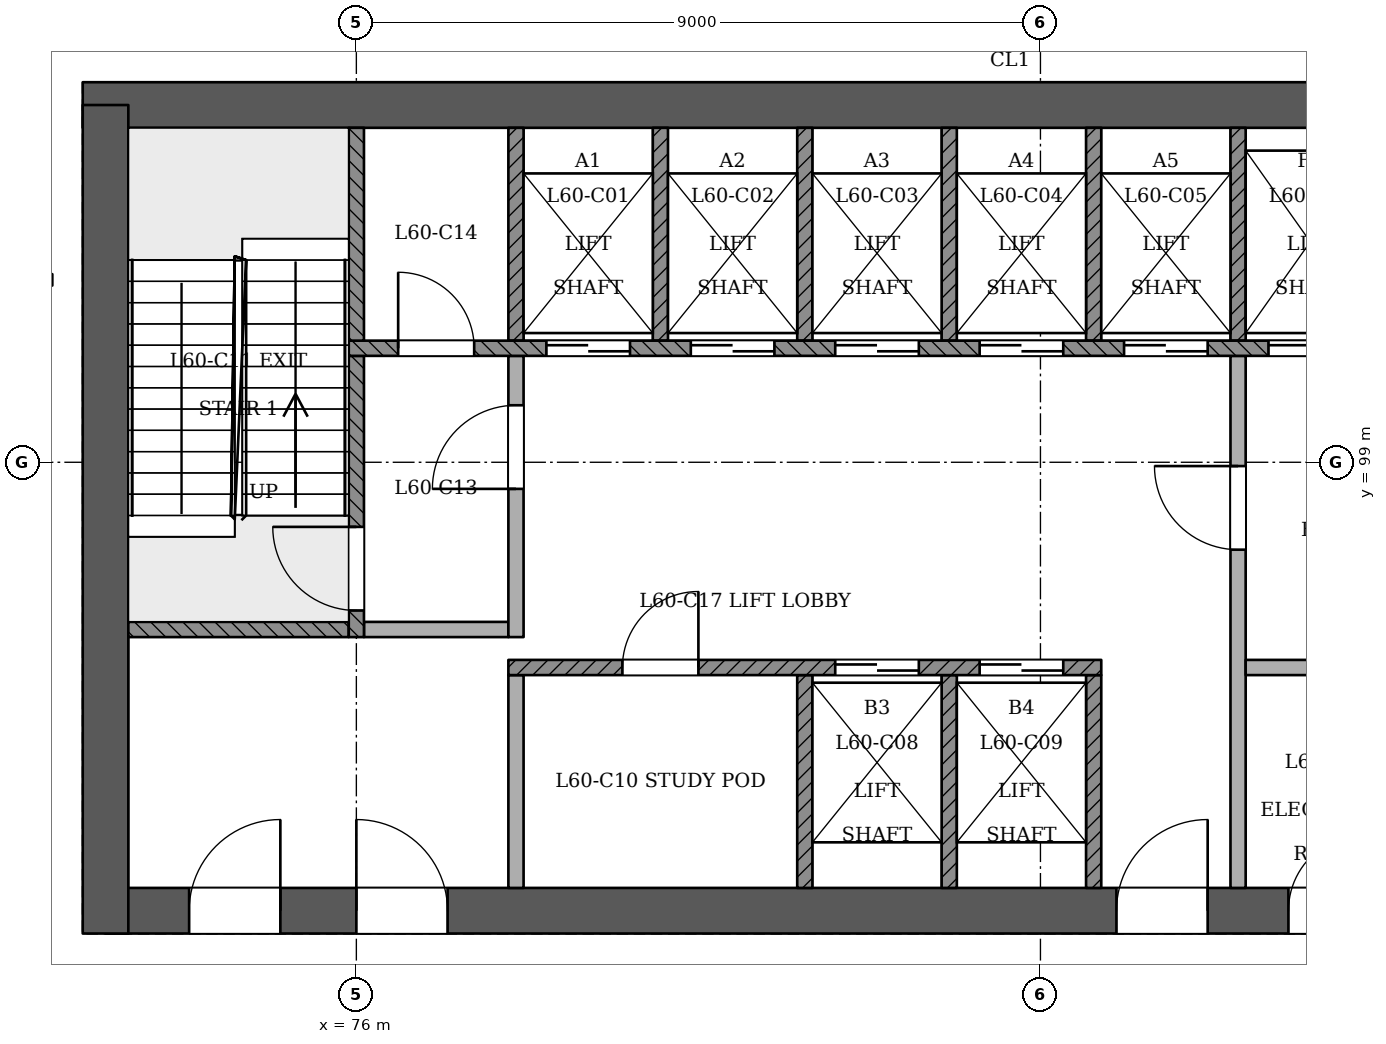
"""IFC4 building model, lengths in metres.
Left out: names, types, materials, properties, quantities, classifications, styles, units other than length and angle.
Written with IfcOpenShell. Run it as: python <this file> out.ifc"""

import sys

from ifc_helpers import new_model, si_unit, direction, frame, frame_2d, origin, place, context, subcontext, project, spatial, rectangle, extrude, element, fill, save


model = new_model("IFC4")
c1 = context("Model", 3, precision=1e-05, world=origin(), true_north=direction((0.0, 1.0)))
c2 = subcontext(c1, "Body", "Model", "MODEL_VIEW")
j1 = project(units=[si_unit("LENGTHUNIT", "METRE"), si_unit("PLANEANGLEUNIT", "RADIAN")], contexts=[c1])
p1 = place(None, origin())
s1 = spatial("IfcSite", under=j1, at=p1, CompositionType="ELEMENT")
p2 = place(p1, origin())
s2 = spatial("IfcBuilding", under=s1, at=p2, CompositionType="ELEMENT")
p3 = place(p2, frame((0.0, 0.0, 233.8)))
s3 = spatial("IfcBuildingStorey", under=s2, at=p3, CompositionType="ELEMENT", Elevation=233.8)
p4 = place(p3, frame((72.7, 93.1, 0.0), z_axis=(0.0, 0.0, 1.0), x_axis=(1.0, 0.0, 0.0)))
e1 = element("IfcWall", 1, at=p4, inside=s3, PredefinedType="SHEAR", context=c2, shape_type="SweptSolid", body=[
    extrude(rectangle(XDim=24.9, YDim=0.6, at=frame_2d((12.45, 0.0))), origin(), (0.0, 0.0, 1.0), 5.4),
])
p5 = place(p4, frame((1.1, 0.0, 0.0)))
e2 = element("IfcOpeningElement", 2, at=p5, cuts=e1, PredefinedType="OPENING", context=c2, shape_type="SweptSolid", body=[
    extrude(rectangle(XDim=1.2, YDim=2.1, at=frame_2d((0.6, 1.05))), frame((0.0, 0.311, 0.0), z_axis=(0.0, -1.0, 0.0), x_axis=(1.0, 0.0, 0.0)), (0.0, 0.0, 1.0), 0.621),
])
p6 = place(p4, frame((3.3, 0.0, 0.0)))
e3 = element("IfcOpeningElement", 3, at=p6, cuts=e1, PredefinedType="OPENING", context=c2, shape_type="SweptSolid", body=[
    extrude(rectangle(XDim=1.2, YDim=2.1, at=frame_2d((0.6, 1.05))), frame((0.0, 0.311, 0.0), z_axis=(0.0, -1.0, 0.0), x_axis=(1.0, 0.0, 0.0)), (0.0, 0.0, 1.0), 0.621),
])
p7 = place(p4, frame((13.3, 0.0, 0.0)))
e4 = element("IfcOpeningElement", 4, at=p7, cuts=e1, PredefinedType="OPENING", context=c2, shape_type="SweptSolid", body=[
    extrude(rectangle(XDim=1.2, YDim=2.1, at=frame_2d((0.6, 1.05))), frame((0.0, 0.311, 0.0), z_axis=(0.0, -1.0, 0.0), x_axis=(1.0, 0.0, 0.0)), (0.0, 0.0, 1.0), 0.621),
])
p8 = place(p4, frame((15.562, 0.0, 0.0)))
e5 = element("IfcOpeningElement", 5, at=p8, cuts=e1, PredefinedType="OPENING", context=c2, shape_type="SweptSolid", body=[
    extrude(rectangle(XDim=1.0, YDim=2.1, at=frame_2d((0.5, 1.05))), frame((0.0, 0.311, 0.0), z_axis=(0.0, -1.0, 0.0), x_axis=(1.0, 0.0, 0.0)), (0.0, 0.0, 1.0), 0.621),
])
p9 = place(p4, frame((18.2, 0.0, 0.0)))
e6 = element("IfcOpeningElement", 6, at=p9, cuts=e1, PredefinedType="OPENING", context=c2, shape_type="SweptSolid", body=[
    extrude(rectangle(XDim=1.0, YDim=2.1, at=frame_2d((0.5, 1.05))), frame((0.0, 0.311, 0.0), z_axis=(0.0, -1.0, 0.0), x_axis=(1.0, 0.0, 0.0)), (0.0, 0.0, 1.0), 0.621),
])
p10 = place(p4, frame((21.788, 0.0, 0.0)))
e7 = element("IfcOpeningElement", 7, at=p10, cuts=e1, PredefinedType="OPENING", context=c2, shape_type="SweptSolid", body=[
    extrude(rectangle(XDim=1.0, YDim=2.1, at=frame_2d((0.5, 1.05))), frame((0.0, 0.311, 0.0), z_axis=(0.0, -1.0, 0.0), x_axis=(1.0, 0.0, 0.0)), (0.0, 0.0, 1.0), 0.621),
])
p11 = place(p3, frame((97.3, 103.7, 0.0), z_axis=(0.0, 0.0, 1.0), x_axis=(-1.0, 0.0, 0.0)))
e8 = element("IfcWall", 8, at=p11, inside=s3, PredefinedType="SHEAR", context=c2, shape_type="SweptSolid", body=[
    extrude(rectangle(XDim=24.9, YDim=0.6, at=frame_2d((12.45, 0.0))), origin(), (0.0, 0.0, 1.0), 5.4),
])
p12 = place(p3, frame((72.7, 103.7, 0.0), z_axis=(0.0, 0.0, 1.0), x_axis=(0.0, -1.0, 0.0)))
e9 = element("IfcWall", 9, at=p12, inside=s3, PredefinedType="SHEAR", context=c2, shape_type="SweptSolid", body=[
    extrude(rectangle(XDim=10.9, YDim=0.6, at=frame_2d((5.45, 0.0))), origin(), (0.0, 0.0, 1.0), 5.4),
])
p13 = place(p3, frame((72.0, 101.4, 0.0), z_axis=(0.0, 0.0, 1.0), x_axis=(-1.0, 0.0, 0.0)))
e10 = element("IfcWall", 10, at=p13, inside=s3, PredefinedType="PARTITIONING", context=c2, shape_type="SweptSolid", body=[
    extrude(rectangle(XDim=1.8, YDim=0.15, at=frame_2d((0.9, 0.0))), origin(), (0.0, 0.0, 1.0), 5.0),
])
p14 = place(p3, frame((78.1, 93.4, 0.0), z_axis=(0.0, 0.0, 1.0), x_axis=(0.0, 1.0, 0.0)))
e11 = element("IfcWall", 11, at=p14, inside=s3, PredefinedType="PARTITIONING", context=c2, shape_type="SweptSolid", body=[
    extrude(rectangle(XDim=2.8, YDim=0.2, at=frame_2d((1.4, 0.0))), origin(), (0.0, 0.0, 1.0), 5.0),
])
for number, where, z_axis, x_axis in (
    (12, (81.9, 93.4, 0.0), (0.0, 0.0, 1.0), (0.0, 1.0, 0.0)),
    (13, (83.8, 93.4, 0.0), (0.0, 0.0, 1.0), (0.0, 1.0, 0.0)),
    (14, (85.7, 93.4, 0.0), (0.0, 0.0, 1.0), (0.0, 1.0, 0.0)),
):
    element("IfcWall", number, at=place(p3, frame(where, z_axis=z_axis, x_axis=x_axis)), inside=s3, PredefinedType="SOLIDWALL", context=c2, shape_type="SweptSolid", body=[
        extrude(rectangle(XDim=2.8, YDim=0.2, at=frame_2d((1.4, 0.0))), origin(), (0.0, 0.0, 1.0), 5.0),
    ])
p15 = place(p3, frame((87.6, 93.4, 0.0), z_axis=(0.0, 0.0, 1.0), x_axis=(0.0, 1.0, 0.0)))
e15 = element("IfcWall", 15, at=p15, inside=s3, PredefinedType="PARTITIONING", context=c2, shape_type="SweptSolid", body=[
    extrude(rectangle(XDim=7.0, YDim=0.2, at=frame_2d((3.5, 0.0))), origin(), (0.0, 0.0, 1.0), 5.0),
])
p16 = place(p15, frame((4.45, 0.0, 0.0)))
e16 = element("IfcOpeningElement", 16, at=p16, cuts=e15, PredefinedType="OPENING", context=c2, shape_type="SweptSolid", body=[
    extrude(rectangle(XDim=1.1, YDim=2.1, at=frame_2d((0.55, 1.05))), frame((0.0, 0.11, 0.0), z_axis=(0.0, -1.0, 0.0), x_axis=(1.0, 0.0, 0.0)), (0.0, 0.0, 1.0), 0.221),
])
p17 = place(p3, frame((78.0, 96.3, 0.0), z_axis=(0.0, 0.0, 1.0), x_axis=(1.0, 0.0, 0.0)))
e17 = element("IfcWall", 17, at=p17, inside=s3, PredefinedType="SOLIDWALL", context=c2, shape_type="SweptSolid", body=[
    extrude(rectangle(XDim=7.8, YDim=0.2, at=frame_2d((3.9, 0.0))), origin(), (0.0, 0.0, 1.0), 5.0),
])
p18 = place(p17, frame((4.3, 0.0, 0.0)))
e18 = element("IfcOpeningElement", 18, at=p18, cuts=e17, PredefinedType="OPENING", context=c2, shape_type="SweptSolid", body=[
    extrude(rectangle(XDim=1.1, YDim=2.1, at=frame_2d((0.55, 1.05))), frame((0.0, 0.11, 0.0), z_axis=(0.0, -1.0, 0.0), x_axis=(1.0, 0.0, 0.0)), (0.0, 0.0, 1.0), 0.221),
])
p19 = place(p17, frame((6.2, 0.0, 0.0)))
e19 = element("IfcOpeningElement", 19, at=p19, cuts=e17, PredefinedType="OPENING", context=c2, shape_type="SweptSolid", body=[
    extrude(rectangle(XDim=1.1, YDim=2.1, at=frame_2d((0.55, 1.05))), frame((0.0, 0.11, 0.0), z_axis=(0.0, -1.0, 0.0), x_axis=(1.0, 0.0, 0.0)), (0.0, 0.0, 1.0), 0.221),
])
p20 = place(p17, frame((1.5, 0.0, 0.0)))
e20 = element("IfcOpeningElement", 20, at=p20, cuts=e17, PredefinedType="OPENING", context=c2, shape_type="SweptSolid", body=[
    extrude(rectangle(XDim=1.0, YDim=2.1, at=frame_2d((0.5, 1.05))), frame((0.0, 0.11, 0.0), z_axis=(0.0, -1.0, 0.0), x_axis=(1.0, 0.0, 0.0)), (0.0, 0.0, 1.0), 0.221),
])
p21 = place(p3, frame((87.7, 96.3, 0.0), z_axis=(0.0, 0.0, 1.0), x_axis=(1.0, 0.0, 0.0)))
e21 = element("IfcWall", 21, at=p21, inside=s3, PredefinedType="PARTITIONING", context=c2, shape_type="SweptSolid", body=[
    extrude(rectangle(XDim=3.6, YDim=0.2, at=frame_2d((1.8, 0.0))), origin(), (0.0, 0.0, 1.0), 5.0),
])
p22 = place(p3, frame((73.0, 96.8, 0.0), z_axis=(0.0, 0.0, 1.0), x_axis=(1.0, 0.0, 0.0)))
e22 = element("IfcWall", 22, at=p22, inside=s3, PredefinedType="SOLIDWALL", context=c2, shape_type="SweptSolid", body=[
    extrude(rectangle(XDim=2.9, YDim=0.2, at=frame_2d((1.45, 0.0))), origin(), (0.0, 0.0, 1.0), 5.0),
])
p23 = place(p3, frame((76.0, 96.7, 0.0), z_axis=(0.0, 0.0, 1.0), x_axis=(0.0, 1.0, 0.0)))
e23 = element("IfcWall", 23, at=p23, inside=s3, PredefinedType="SOLIDWALL", context=c2, shape_type="SweptSolid", body=[
    extrude(rectangle(XDim=3.7, YDim=0.2, at=frame_2d((1.85, 0.0))), origin(), (0.0, 0.0, 1.0), 5.0),
])
p24 = place(p23, frame((0.35, 0.0, 0.0)))
e24 = element("IfcOpeningElement", 24, at=p24, cuts=e23, PredefinedType="OPENING", context=c2, shape_type="SweptSolid", body=[
    extrude(rectangle(XDim=1.1, YDim=2.1, at=frame_2d((0.55, 1.05))), frame((0.0, 0.11, 0.0), z_axis=(0.0, -1.0, 0.0), x_axis=(1.0, 0.0, 0.0)), (0.0, 0.0, 1.0), 0.221),
])
p25 = place(p3, frame((76.1, 96.8, 0.0), z_axis=(0.0, 0.0, 1.0), x_axis=(1.0, 0.0, 0.0)))
e25 = element("IfcWall", 25, at=p25, inside=s3, PredefinedType="PARTITIONING", context=c2, shape_type="SweptSolid", body=[
    extrude(rectangle(XDim=1.9, YDim=0.2, at=frame_2d((0.95, 0.0))), origin(), (0.0, 0.0, 1.0), 5.0),
])
p26 = place(p3, frame((78.1, 96.7, 0.0), z_axis=(0.0, 0.0, 1.0), x_axis=(0.0, 1.0, 0.0)))
e26 = element("IfcWall", 26, at=p26, inside=s3, PredefinedType="PARTITIONING", context=c2, shape_type="SweptSolid", body=[
    extrude(rectangle(XDim=3.7, YDim=0.2, at=frame_2d((1.85, 0.0))), origin(), (0.0, 0.0, 1.0), 5.0),
])
p27 = place(p26, frame((1.95, 0.0, 0.0)))
e27 = element("IfcOpeningElement", 27, at=p27, cuts=e26, PredefinedType="OPENING", context=c2, shape_type="SweptSolid", body=[
    extrude(rectangle(XDim=1.1, YDim=2.1, at=frame_2d((0.55, 1.05))), frame((0.0, 0.11, 0.0), z_axis=(0.0, -1.0, 0.0), x_axis=(1.0, 0.0, 0.0)), (0.0, 0.0, 1.0), 0.221),
])
p28 = place(p3, frame((75.9, 100.5, 0.0), z_axis=(0.0, 0.0, 1.0), x_axis=(1.0, 0.0, 0.0)))
e28 = element("IfcWall", 28, at=p28, inside=s3, PredefinedType="SOLIDWALL", context=c2, shape_type="SweptSolid", body=[
    extrude(rectangle(XDim=18.2, YDim=0.2, at=frame_2d((9.1, 0.0))), origin(), (0.0, 0.0, 1.0), 5.0),
])
p29 = place(p28, frame((2.6, 0.0, 0.0)))
e29 = element("IfcOpeningElement", 29, at=p29, cuts=e28, PredefinedType="OPENING", context=c2, shape_type="SweptSolid", body=[
    extrude(rectangle(XDim=1.1, YDim=2.1, at=frame_2d((0.55, 1.05))), frame((0.0, 0.11, 0.0), z_axis=(0.0, -1.0, 0.0), x_axis=(1.0, 0.0, 0.0)), (0.0, 0.0, 1.0), 0.221),
])
p30 = place(p28, frame((4.5, 0.0, 0.0)))
e30 = element("IfcOpeningElement", 30, at=p30, cuts=e28, PredefinedType="OPENING", context=c2, shape_type="SweptSolid", body=[
    extrude(rectangle(XDim=1.1, YDim=2.1, at=frame_2d((0.55, 1.05))), frame((0.0, 0.11, 0.0), z_axis=(0.0, -1.0, 0.0), x_axis=(1.0, 0.0, 0.0)), (0.0, 0.0, 1.0), 0.221),
])
p31 = place(p28, frame((6.4, 0.0, 0.0)))
e31 = element("IfcOpeningElement", 31, at=p31, cuts=e28, PredefinedType="OPENING", context=c2, shape_type="SweptSolid", body=[
    extrude(rectangle(XDim=1.1, YDim=2.1, at=frame_2d((0.55, 1.05))), frame((0.0, 0.11, 0.0), z_axis=(0.0, -1.0, 0.0), x_axis=(1.0, 0.0, 0.0)), (0.0, 0.0, 1.0), 0.221),
])
p32 = place(p28, frame((8.3, 0.0, 0.0)))
e32 = element("IfcOpeningElement", 32, at=p32, cuts=e28, PredefinedType="OPENING", context=c2, shape_type="SweptSolid", body=[
    extrude(rectangle(XDim=1.1, YDim=2.1, at=frame_2d((0.55, 1.05))), frame((0.0, 0.11, 0.0), z_axis=(0.0, -1.0, 0.0), x_axis=(1.0, 0.0, 0.0)), (0.0, 0.0, 1.0), 0.221),
])
p33 = place(p28, frame((10.2, 0.0, 0.0)))
e33 = element("IfcOpeningElement", 33, at=p33, cuts=e28, PredefinedType="OPENING", context=c2, shape_type="SweptSolid", body=[
    extrude(rectangle(XDim=1.1, YDim=2.1, at=frame_2d((0.55, 1.05))), frame((0.0, 0.11, 0.0), z_axis=(0.0, -1.0, 0.0), x_axis=(1.0, 0.0, 0.0)), (0.0, 0.0, 1.0), 0.221),
])
p34 = place(p28, frame((12.1, 0.0, 0.0)))
e34 = element("IfcOpeningElement", 34, at=p34, cuts=e28, PredefinedType="OPENING", context=c2, shape_type="SweptSolid", body=[
    extrude(rectangle(XDim=1.1, YDim=2.1, at=frame_2d((0.55, 1.05))), frame((0.0, 0.11, 0.0), z_axis=(0.0, -1.0, 0.0), x_axis=(1.0, 0.0, 0.0)), (0.0, 0.0, 1.0), 0.221),
])
p35 = place(p28, frame((14.0, 0.0, 0.0)))
e35 = element("IfcOpeningElement", 35, at=p35, cuts=e28, PredefinedType="OPENING", context=c2, shape_type="SweptSolid", body=[
    extrude(rectangle(XDim=1.1, YDim=2.1, at=frame_2d((0.55, 1.05))), frame((0.0, 0.11, 0.0), z_axis=(0.0, -1.0, 0.0), x_axis=(1.0, 0.0, 0.0)), (0.0, 0.0, 1.0), 0.221),
])
p36 = place(p28, frame((0.65, 0.0, 0.0)))
e36 = element("IfcOpeningElement", 36, at=p36, cuts=e28, PredefinedType="OPENING", context=c2, shape_type="SweptSolid", body=[
    extrude(rectangle(XDim=1.0, YDim=2.1, at=frame_2d((0.5, 1.05))), frame((0.0, 0.11, 0.0), z_axis=(0.0, -1.0, 0.0), x_axis=(1.0, 0.0, 0.0)), (0.0, 0.0, 1.0), 0.221),
])
p37 = place(p28, frame((16.3, 0.0, 0.0)))
e37 = element("IfcOpeningElement", 37, at=p37, cuts=e28, PredefinedType="OPENING", context=c2, shape_type="SweptSolid", body=[
    extrude(rectangle(XDim=1.0, YDim=2.1, at=frame_2d((0.5, 1.05))), frame((0.0, 0.11, 0.0), z_axis=(0.0, -1.0, 0.0), x_axis=(1.0, 0.0, 0.0)), (0.0, 0.0, 1.0), 0.221),
])
for number, where, z_axis, x_axis in (
    (38, (76.0, 100.6, 0.0), (0.0, 0.0, 1.0), (0.0, 1.0, 0.0)),
    (39, (78.1, 100.6, 0.0), (0.0, 0.0, 1.0), (0.0, 1.0, 0.0)),
    (40, (80.0, 100.6, 0.0), (0.0, 0.0, 1.0), (0.0, 1.0, 0.0)),
    (41, (81.9, 100.6, 0.0), (0.0, 0.0, 1.0), (0.0, 1.0, 0.0)),
    (42, (83.8, 100.6, 0.0), (0.0, 0.0, 1.0), (0.0, 1.0, 0.0)),
    (43, (85.7, 100.6, 0.0), (0.0, 0.0, 1.0), (0.0, 1.0, 0.0)),
    (44, (87.6, 100.6, 0.0), (0.0, 0.0, 1.0), (0.0, 1.0, 0.0)),
):
    element("IfcWall", number, at=place(p3, frame(where, z_axis=z_axis, x_axis=x_axis)), inside=s3, PredefinedType="SOLIDWALL", context=c2, shape_type="SweptSolid", body=[
        extrude(rectangle(XDim=2.8, YDim=0.2, at=frame_2d((1.4, 0.0))), origin(), (0.0, 0.0, 1.0), 5.0),
    ])
p38 = place(p29, origin())
e45 = element("IfcDoor", 45, at=p38, inside=s3, OperationType="SLIDING_TO_RIGHT", PredefinedType="NOTDEFINED", context=c2, shape_type="SweptSolid", body=[
    extrude(rectangle(XDim=1.1, YDim=2.1, at=frame_2d((0.55, 1.05))), frame((0.0, 0.025, 0.0), z_axis=(0.0, -1.0, 0.0), x_axis=(1.0, 0.0, 0.0)), (0.0, 0.0, 1.0), 0.05),
])
fill(e29, e45)
p39 = place(p30, origin())
e46 = element("IfcDoor", 46, at=p39, inside=s3, OperationType="SLIDING_TO_LEFT", PredefinedType="NOTDEFINED", context=c2, shape_type="SweptSolid", body=[
    extrude(rectangle(XDim=1.1, YDim=2.1, at=frame_2d((0.55, 1.05))), frame((0.0, 0.025, 0.0), z_axis=(0.0, -1.0, 0.0), x_axis=(1.0, 0.0, 0.0)), (0.0, 0.0, 1.0), 0.05),
])
fill(e30, e46)
p40 = place(p31, origin())
e47 = element("IfcDoor", 47, at=p40, inside=s3, OperationType="SLIDING_TO_RIGHT", PredefinedType="NOTDEFINED", context=c2, shape_type="SweptSolid", body=[
    extrude(rectangle(XDim=1.1, YDim=2.1, at=frame_2d((0.55, 1.05))), frame((0.0, 0.025, 0.0), z_axis=(0.0, -1.0, 0.0), x_axis=(1.0, 0.0, 0.0)), (0.0, 0.0, 1.0), 0.05),
])
fill(e31, e47)
p41 = place(p32, origin())
e48 = element("IfcDoor", 48, at=p41, inside=s3, OperationType="SLIDING_TO_LEFT", PredefinedType="NOTDEFINED", context=c2, shape_type="SweptSolid", body=[
    extrude(rectangle(XDim=1.1, YDim=2.1, at=frame_2d((0.55, 1.05))), frame((0.0, 0.025, 0.0), z_axis=(0.0, -1.0, 0.0), x_axis=(1.0, 0.0, 0.0)), (0.0, 0.0, 1.0), 0.05),
])
fill(e32, e48)
p42 = place(p33, origin())
e49 = element("IfcDoor", 49, at=p42, inside=s3, OperationType="SLIDING_TO_RIGHT", PredefinedType="NOTDEFINED", context=c2, shape_type="SweptSolid", body=[
    extrude(rectangle(XDim=1.1, YDim=2.1, at=frame_2d((0.55, 1.05))), frame((0.0, 0.025, 0.0), z_axis=(0.0, -1.0, 0.0), x_axis=(1.0, 0.0, 0.0)), (0.0, 0.0, 1.0), 0.05),
])
fill(e33, e49)
p43 = place(p18, origin())
e50 = element("IfcDoor", 50, at=p43, inside=s3, OperationType="SLIDING_TO_RIGHT", PredefinedType="NOTDEFINED", context=c2, shape_type="SweptSolid", body=[
    extrude(rectangle(XDim=1.1, YDim=2.1, at=frame_2d((0.55, 1.05))), frame((0.0, 0.025, 0.0), z_axis=(0.0, -1.0, 0.0), x_axis=(1.0, 0.0, 0.0)), (0.0, 0.0, 1.0), 0.05),
])
fill(e18, e50)
p44 = place(p19, origin())
e51 = element("IfcDoor", 51, at=p44, inside=s3, OperationType="SLIDING_TO_LEFT", PredefinedType="NOTDEFINED", context=c2, shape_type="SweptSolid", body=[
    extrude(rectangle(XDim=1.1, YDim=2.1, at=frame_2d((0.55, 1.05))), frame((0.0, 0.025, 0.0), z_axis=(0.0, -1.0, 0.0), x_axis=(1.0, 0.0, 0.0)), (0.0, 0.0, 1.0), 0.05),
])
fill(e19, e51)
p45 = place(p34, origin())
e52 = element("IfcDoor", 52, at=p45, inside=s3, OperationType="SLIDING_TO_RIGHT", PredefinedType="NOTDEFINED", context=c2, shape_type="SweptSolid", body=[
    extrude(rectangle(XDim=1.1, YDim=2.1, at=frame_2d((0.55, 1.05))), frame((0.0, 0.025, 0.0), z_axis=(0.0, -1.0, 0.0), x_axis=(1.0, 0.0, 0.0)), (0.0, 0.0, 1.0), 0.05),
])
fill(e34, e52)
p46 = place(p24, origin())
e53 = element("IfcDoor", 53, at=p46, inside=s3, OperationType="SINGLE_SWING_RIGHT", PredefinedType="NOTDEFINED", context=c2, shape_type="SweptSolid", body=[
    extrude(rectangle(XDim=1.1, YDim=2.1, at=frame_2d((0.55, 1.05))), frame((0.0, 0.025, 0.0), z_axis=(0.0, -1.0, 0.0), x_axis=(1.0, 0.0, 0.0)), (0.0, 0.0, 1.0), 0.05),
])
fill(e24, e53)
p47 = place(p27, origin())
e54 = element("IfcDoor", 54, at=p47, inside=s3, OperationType="SINGLE_SWING_LEFT", PredefinedType="NOTDEFINED", context=c2, shape_type="SweptSolid", body=[
    extrude(rectangle(XDim=1.1, YDim=2.1, at=frame_2d((0.55, 1.05))), frame((0.0, 0.025, 0.0), z_axis=(0.0, -1.0, 0.0), x_axis=(1.0, 0.0, 0.0)), (0.0, 0.0, 1.0), 0.05),
])
fill(e27, e54)
p48 = place(p16, origin())
e55 = element("IfcDoor", 55, at=p48, inside=s3, OperationType="SINGLE_SWING_RIGHT", PredefinedType="NOTDEFINED", context=c2, shape_type="SweptSolid", body=[
    extrude(rectangle(XDim=1.1, YDim=2.1, at=frame_2d((0.55, 1.05))), frame((0.0, 0.025, 0.0), z_axis=(0.0, -1.0, 0.0), x_axis=(1.0, 0.0, 0.0)), (0.0, 0.0, 1.0), 0.05),
])
fill(e16, e55)
p49 = place(p5, origin())
e56 = element("IfcDoor", 56, at=p49, inside=s3, OperationType="SINGLE_SWING_RIGHT", PredefinedType="NOTDEFINED", context=c2, shape_type="SweptSolid", body=[
    extrude(rectangle(XDim=1.2, YDim=2.1, at=frame_2d((0.6, 1.05))), frame((0.0, 0.025, 0.0), z_axis=(0.0, -1.0, 0.0), x_axis=(1.0, 0.0, 0.0)), (0.0, 0.0, 1.0), 0.05),
])
fill(e2, e56)
p50 = place(p6, origin())
e57 = element("IfcDoor", 57, at=p50, inside=s3, OperationType="SINGLE_SWING_LEFT", PredefinedType="NOTDEFINED", context=c2, shape_type="SweptSolid", body=[
    extrude(rectangle(XDim=1.2, YDim=2.1, at=frame_2d((0.6, 1.05))), frame((0.0, 0.025, 0.0), z_axis=(0.0, -1.0, 0.0), x_axis=(1.0, 0.0, 0.0)), (0.0, 0.0, 1.0), 0.05),
])
fill(e3, e57)
p51 = place(p7, origin())
e58 = element("IfcDoor", 58, at=p51, inside=s3, OperationType="SINGLE_SWING_RIGHT", PredefinedType="NOTDEFINED", context=c2, shape_type="SweptSolid", body=[
    extrude(rectangle(XDim=1.2, YDim=2.1, at=frame_2d((0.6, 1.05))), frame((0.0, 0.025, 0.0), z_axis=(0.0, -1.0, 0.0), x_axis=(1.0, 0.0, 0.0)), (0.0, 0.0, 1.0), 0.05),
])
fill(e4, e58)
p52 = place(p36, origin())
e59 = element("IfcDoor", 59, at=p52, inside=s3, OperationType="SINGLE_SWING_LEFT", PredefinedType="NOTDEFINED", context=c2, shape_type="SweptSolid", body=[
    extrude(rectangle(XDim=1.0, YDim=2.1, at=frame_2d((0.5, 1.05))), frame((0.0, 0.025, 0.0), z_axis=(0.0, -1.0, 0.0), x_axis=(1.0, 0.0, 0.0)), (0.0, 0.0, 1.0), 0.05),
])
fill(e36, e59)
p53 = place(p8, origin())
e60 = element("IfcDoor", 60, at=p53, inside=s3, OperationType="SINGLE_SWING_RIGHT", PredefinedType="NOTDEFINED", context=c2, shape_type="SweptSolid", body=[
    extrude(rectangle(XDim=1.0, YDim=2.1, at=frame_2d((0.5, 1.05))), frame((0.0, 0.025, 0.0), z_axis=(0.0, -1.0, 0.0), x_axis=(1.0, 0.0, 0.0)), (0.0, 0.0, 1.0), 0.05),
])
fill(e5, e60)
p54 = place(p20, origin())
e61 = element("IfcDoor", 61, at=p54, inside=s3, OperationType="SINGLE_SWING_RIGHT", PredefinedType="NOTDEFINED", context=c2, shape_type="SweptSolid", body=[
    extrude(rectangle(XDim=1.0, YDim=2.1, at=frame_2d((0.5, 1.05))), frame((0.0, 0.025, 0.0), z_axis=(0.0, -1.0, 0.0), x_axis=(1.0, 0.0, 0.0)), (0.0, 0.0, 1.0), 0.05),
])
fill(e20, e61)
save(model, sys.argv[1])
